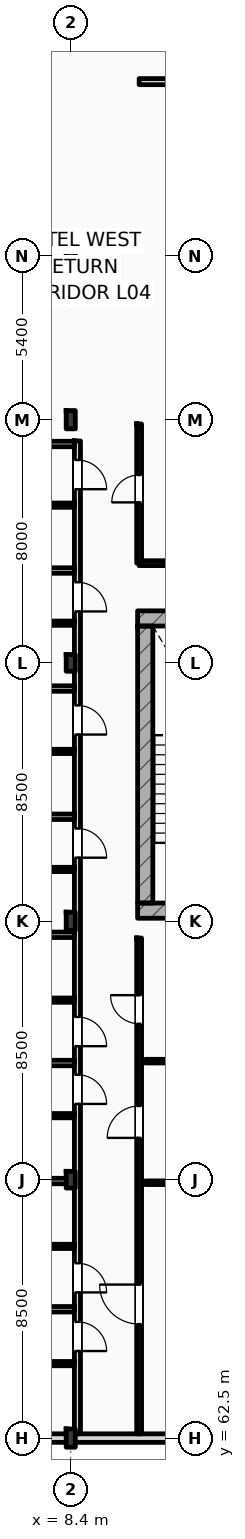
"""IFC4 building model, lengths in metres.
Left out: names, types, materials, properties, quantities, classifications, styles, units other than length and angle.
Written with IfcOpenShell. Run it as: python <this file> out.ifc"""

import sys

from ifc_helpers import new_model, si_unit, direction, frame, frame_2d, origin, origin_2d, place, context, subcontext, project, spatial, rectangle, i_section, extrude, element, fill, save


model = new_model("IFC4")
c1 = context("Model", 3, precision=1e-05, world=origin(), true_north=direction((0.0, 1.0)))
c2 = subcontext(c1, "Body", "Model", "MODEL_VIEW")
j1 = project(units=[si_unit("LENGTHUNIT", "METRE"), si_unit("PLANEANGLEUNIT", "RADIAN")], contexts=[c1])
p1 = place(None, origin())
s1 = spatial("IfcSite", under=j1, at=p1, CompositionType="ELEMENT")
p2 = place(p1, origin())
s2 = spatial("IfcBuilding", under=s1, at=p2, CompositionType="ELEMENT")
p3 = place(p2, frame((0.0, 0.0, 20.4)))
s3 = spatial("IfcBuildingStorey", under=s2, at=p3, CompositionType="ELEMENT", Elevation=20.4)
p4 = place(p3, frame((8.4, 62.5, 0.0), z_axis=(0.0, 0.0, 1.0), x_axis=(1.0, 0.0, 0.0)))
e1 = element("IfcColumn", 1, at=p4, inside=s3, PredefinedType="COLUMN", context=c2, shape_type="SweptSolid", body=[
    extrude(i_section(OverallWidth=0.3, OverallDepth=0.6, WebThickness=0.015, FlangeThickness=0.03, FilletRadius=0.027, at=origin_2d()), origin(), (0.0, 0.0, 1.0), 4.2),
])
p5 = place(p3, frame((8.4, 71.0, 0.0), z_axis=(0.0, 0.0, 1.0), x_axis=(1.0, 0.0, 0.0)))
e2 = element("IfcColumn", 2, at=p5, inside=s3, PredefinedType="COLUMN", context=c2, shape_type="SweptSolid", body=[
    extrude(i_section(OverallWidth=0.3, OverallDepth=0.55, WebThickness=0.015, FlangeThickness=0.029, FilletRadius=0.027, at=origin_2d()), origin(), (0.0, 0.0, 1.0), 4.2),
])
p6 = place(p3, frame((8.4, 79.5, 0.0), z_axis=(0.0, 0.0, 1.0), x_axis=(1.0, 0.0, 0.0)))
e3 = element("IfcColumn", 3, at=p6, inside=s3, PredefinedType="COLUMN", context=c2, shape_type="SweptSolid", body=[
    extrude(i_section(OverallWidth=0.3, OverallDepth=0.6, WebThickness=0.015, FlangeThickness=0.03, FilletRadius=0.027, at=origin_2d()), origin(), (0.0, 0.0, 1.0), 4.2),
])
p7 = place(p3, frame((8.4, 88.0, 0.0), z_axis=(0.0, 0.0, 1.0), x_axis=(1.0, 0.0, 0.0)))
e4 = element("IfcColumn", 4, at=p7, inside=s3, PredefinedType="COLUMN", context=c2, shape_type="SweptSolid", body=[
    extrude(i_section(OverallWidth=0.3, OverallDepth=0.55, WebThickness=0.015, FlangeThickness=0.029, FilletRadius=0.027, at=origin_2d()), origin(), (0.0, 0.0, 1.0), 4.2),
])
p8 = place(p3, frame((8.4, 96.0, 0.0), z_axis=(0.0, 0.0, 1.0), x_axis=(1.0, 0.0, 0.0)))
e5 = element("IfcColumn", 5, at=p8, inside=s3, PredefinedType="COLUMN", context=c2, shape_type="SweptSolid", body=[
    extrude(i_section(OverallWidth=0.3, OverallDepth=0.6, WebThickness=0.015, FlangeThickness=0.03, FilletRadius=0.027, at=origin_2d()), origin(), (0.0, 0.0, 1.0), 4.2),
])
p9 = place(p3, frame((8.4, 101.4, 0.0), z_axis=(0.0, 0.0, 1.0), x_axis=(1.0, 0.0, 0.0)))
e6 = element("IfcColumn", 6, at=p9, inside=s3, PredefinedType="COLUMN", context=c2, shape_type="SweptSolid", body=[
    extrude(i_section(OverallWidth=0.3, OverallDepth=0.55, WebThickness=0.015, FlangeThickness=0.029, FilletRadius=0.027, at=origin_2d()), origin(), (0.0, 0.0, 1.0), 4.2),
])
for number, where, z_axis, x_axis in (
    (7, (10.6, 89.462, 0.0), (0.0, 0.0, 1.0), (1.0, 0.0, 0.0)),
    (8, (10.6, 79.85, 0.0), (0.0, 0.0, 1.0), (1.0, 0.0, 0.0)),
):
    element("IfcWall", number, at=place(p3, frame(where, z_axis=z_axis, x_axis=x_axis)), inside=s3, PredefinedType="SHEAR", context=c2, shape_type="SweptSolid", body=[
        extrude(rectangle(XDim=5.16, YDim=0.5, at=frame_2d((2.58, 0.0))), origin(), (0.0, 0.0, 1.0), 4.2),
    ])
p10 = place(p3, frame((10.85, 80.1, 0.0), z_axis=(0.0, 0.0, 1.0), x_axis=(0.0, 1.0, 0.0)))
e9 = element("IfcWall", 9, at=p10, inside=s3, PredefinedType="SHEAR", context=c2, shape_type="SweptSolid", body=[
    extrude(rectangle(XDim=9.112, YDim=0.5, at=frame_2d((4.556, 0.0))), origin(), (0.0, 0.0, 1.0), 4.2),
])
p11 = place(p3, frame((0.0, 62.5, 0.0), z_axis=(0.0, 0.0, 1.0), x_axis=(1.0, 0.0, 0.0)))
e10 = element("IfcWall", 10, at=p11, inside=s3, PredefinedType="STANDARD", context=c2, shape_type="SweptSolid", body=[
    extrude(rectangle(XDim=25.2, YDim=0.28, at=frame_2d((12.6, 0.0))), origin(), (0.0, 0.0, 1.0), 3.38),
])
p12 = place(p3, frame((10.65, 107.12, 0.0), z_axis=(0.0, 0.0, 1.0), x_axis=(1.0, 0.0, 0.0)))
e11 = element("IfcWall", 11, at=p12, inside=s3, PredefinedType="PARTITIONING", context=c2, shape_type="SweptSolid", body=[
    extrude(rectangle(XDim=14.8, YDim=0.2, at=frame_2d((7.4, 0.0))), origin(), (0.0, 0.0, 1.0), 3.94),
])
p13 = place(p12, frame((8.5, 0.0, 0.0)))
e12 = element("IfcOpeningElement", 12, at=p13, cuts=e11, PredefinedType="OPENING", context=c2, shape_type="SweptSolid", body=[
    extrude(rectangle(XDim=1.25, YDim=2.15, at=frame_2d((0.625, 1.075))), frame((0.0, 0.11, 0.0), z_axis=(0.0, -1.0, 0.0), x_axis=(1.0, 0.0, 0.0)), (0.0, 0.0, 1.0), 0.22),
])
p14 = place(p3, frame((8.62, 62.64, 0.0), z_axis=(0.0, 0.0, 1.0), x_axis=(0.0, 1.0, 0.0)))
e13 = element("IfcWall", 13, at=p14, inside=s3, PredefinedType="PARTITIONING", context=c2, shape_type="SweptSolid", body=[
    extrude(rectangle(XDim=32.66, YDim=0.2, at=frame_2d((16.33, 0.0))), origin(), (0.0, 0.0, 1.0), 3.53),
])
p15 = place(p14, frame((2.724, 0.0, 0.0)))
e14 = element("IfcOpeningElement", 14, at=p15, cuts=e13, PredefinedType="OPENING", context=c2, shape_type="SweptSolid", body=[
    extrude(rectangle(XDim=0.96, YDim=2.2, at=frame_2d((0.48, 1.1))), frame((0.0, 0.11, 0.0), z_axis=(0.0, -1.0, 0.0), x_axis=(1.0, 0.0, 0.0)), (0.0, 0.0, 1.0), 0.22),
])
p16 = place(p14, frame((4.652, 0.0, 0.0)))
e15 = element("IfcOpeningElement", 15, at=p16, cuts=e13, PredefinedType="OPENING", context=c2, shape_type="SweptSolid", body=[
    extrude(rectangle(XDim=0.96, YDim=2.2, at=frame_2d((0.48, 1.1))), frame((0.0, 0.11, 0.0), z_axis=(0.0, -1.0, 0.0), x_axis=(1.0, 0.0, 0.0)), (0.0, 0.0, 1.0), 0.22),
])
p17 = place(p14, frame((10.852, 0.0, 0.0)))
e16 = element("IfcOpeningElement", 16, at=p17, cuts=e13, PredefinedType="OPENING", context=c2, shape_type="SweptSolid", body=[
    extrude(rectangle(XDim=0.96, YDim=2.2, at=frame_2d((0.48, 1.1))), frame((0.0, 0.11, 0.0), z_axis=(0.0, -1.0, 0.0), x_axis=(1.0, 0.0, 0.0)), (0.0, 0.0, 1.0), 0.22),
])
p18 = place(p14, frame((12.752, 0.0, 0.0)))
e17 = element("IfcOpeningElement", 17, at=p18, cuts=e13, PredefinedType="OPENING", context=c2, shape_type="SweptSolid", body=[
    extrude(rectangle(XDim=0.96, YDim=2.2, at=frame_2d((0.48, 1.1))), frame((0.0, 0.11, 0.0), z_axis=(0.0, -1.0, 0.0), x_axis=(1.0, 0.0, 0.0)), (0.0, 0.0, 1.0), 0.22),
])
p19 = place(p14, frame((18.952, 0.0, 0.0)))
e18 = element("IfcOpeningElement", 18, at=p19, cuts=e13, PredefinedType="OPENING", context=c2, shape_type="SweptSolid", body=[
    extrude(rectangle(XDim=0.96, YDim=2.2, at=frame_2d((0.48, 1.1))), frame((0.0, 0.11, 0.0), z_axis=(0.0, -1.0, 0.0), x_axis=(1.0, 0.0, 0.0)), (0.0, 0.0, 1.0), 0.22),
])
p20 = place(p14, frame((23.002, 0.0, 0.0)))
e19 = element("IfcOpeningElement", 19, at=p20, cuts=e13, PredefinedType="OPENING", context=c2, shape_type="SweptSolid", body=[
    extrude(rectangle(XDim=0.96, YDim=2.2, at=frame_2d((0.48, 1.1))), frame((0.0, 0.11, 0.0), z_axis=(0.0, -1.0, 0.0), x_axis=(1.0, 0.0, 0.0)), (0.0, 0.0, 1.0), 0.22),
])
p21 = place(p14, frame((27.052, 0.0, 0.0)))
e20 = element("IfcOpeningElement", 20, at=p21, cuts=e13, PredefinedType="OPENING", context=c2, shape_type="SweptSolid", body=[
    extrude(rectangle(XDim=0.96, YDim=2.2, at=frame_2d((0.48, 1.1))), frame((0.0, 0.11, 0.0), z_axis=(0.0, -1.0, 0.0), x_axis=(1.0, 0.0, 0.0)), (0.0, 0.0, 1.0), 0.22),
])
p22 = place(p14, frame((31.074, 0.0, 0.0)))
e21 = element("IfcOpeningElement", 21, at=p22, cuts=e13, PredefinedType="OPENING", context=c2, shape_type="SweptSolid", body=[
    extrude(rectangle(XDim=0.96, YDim=2.2, at=frame_2d((0.48, 1.1))), frame((0.0, 0.11, 0.0), z_axis=(0.0, -1.0, 0.0), x_axis=(1.0, 0.0, 0.0)), (0.0, 0.0, 1.0), 0.22),
])
p23 = place(p3, frame((10.65, 62.64, 0.0), z_axis=(0.0, 0.0, 1.0), x_axis=(0.0, 1.0, 0.0)))
e22 = element("IfcWall", 22, at=p23, inside=s3, PredefinedType="PARTITIONING", context=c2, shape_type="SweptSolid", body=[
    extrude(rectangle(XDim=16.31, YDim=0.16, at=frame_2d((8.155, 0.0))), origin(), (0.0, 0.0, 1.0), 3.94),
])
p24 = place(p23, frame((3.61, 0.0, 0.0)))
e23 = element("IfcOpeningElement", 23, at=p24, cuts=e22, PredefinedType="OPENING", context=c2, shape_type="SweptSolid", body=[
    extrude(rectangle(XDim=1.3, YDim=2.2, at=frame_2d((0.65, 1.1))), frame((0.0, 0.09, 0.0), z_axis=(0.0, -1.0, 0.0), x_axis=(1.0, 0.0, 0.0)), (0.0, 0.0, 1.0), 0.18),
])
p25 = place(p23, frame((9.735, 0.0, 0.0)))
e24 = element("IfcOpeningElement", 24, at=p25, cuts=e22, PredefinedType="OPENING", context=c2, shape_type="SweptSolid", body=[
    extrude(rectangle(XDim=1.05, YDim=2.12, at=frame_2d((0.525, 1.06))), frame((0.0, 0.09, 0.0), z_axis=(0.0, -1.0, 0.0), x_axis=(1.0, 0.0, 0.0)), (0.0, 0.0, 1.0), 0.18),
])
p26 = place(p23, frame((13.49, 0.0, 0.0)))
e25 = element("IfcOpeningElement", 25, at=p26, cuts=e22, PredefinedType="OPENING", context=c2, shape_type="SweptSolid", body=[
    extrude(rectangle(XDim=0.94, YDim=2.15, at=frame_2d((0.47, 1.075))), frame((0.0, 0.09, 0.0), z_axis=(0.0, -1.0, 0.0), x_axis=(1.0, 0.0, 0.0)), (0.0, 0.0, 1.0), 0.18),
])
p27 = place(p3, frame((10.65, 91.28, 0.0), z_axis=(0.0, 0.0, 1.0), x_axis=(0.0, 1.0, 0.0)))
e26 = element("IfcWall", 26, at=p27, inside=s3, PredefinedType="PARTITIONING", context=c2, shape_type="SweptSolid", body=[
    extrude(rectangle(XDim=4.58, YDim=0.16, at=frame_2d((2.29, 0.0))), origin(), (0.0, 0.0, 1.0), 3.94),
])
p28 = place(p27, frame((2.0, 0.0, 0.0)))
e27 = element("IfcOpeningElement", 27, at=p28, cuts=e26, PredefinedType="OPENING", context=c2, shape_type="SweptSolid", body=[
    extrude(rectangle(XDim=0.9, YDim=2.1, at=frame_2d((0.45, 1.05))), frame((0.0, 0.09, 0.0), z_axis=(0.0, -1.0, 0.0), x_axis=(1.0, 0.0, 0.0)), (0.0, 0.0, 1.0), 0.18),
])
p29 = place(p3, frame((10.65, 91.28, 0.0), z_axis=(0.0, 0.0, 1.0), x_axis=(1.0, 0.0, 0.0)))
e28 = element("IfcWall", 28, at=p29, inside=s3, PredefinedType="PARTITIONING", context=c2, shape_type="SweptSolid", body=[
    extrude(rectangle(XDim=6.9, YDim=0.16, at=frame_2d((3.45, 0.0))), origin(), (0.0, 0.0, 1.0), 3.94),
])
p30 = place(p3, frame((0.15, 66.738, 0.0), z_axis=(0.0, 0.0, 1.0), x_axis=(1.0, 0.0, 0.0)))
e29 = element("IfcWall", 29, at=p30, inside=s3, PredefinedType="PARTITIONING", context=c2, shape_type="SweptSolid", body=[
    extrude(rectangle(XDim=8.37, YDim=0.18, at=frame_2d((4.185, 0.0))), origin(), (0.0, 0.0, 1.0), 3.94),
])
p31 = place(p3, frame((5.05, 64.95, 0.0), z_axis=(0.0, 0.0, 1.0), x_axis=(1.0, 0.0, 0.0)))
e30 = element("IfcWall", 30, at=p31, inside=s3, PredefinedType="PARTITIONING", context=c2, shape_type="SweptSolid", body=[
    extrude(rectangle(XDim=3.47, YDim=0.14, at=frame_2d((1.735, 0.0))), origin(), (0.0, 0.0, 1.0), 3.94),
])
p32 = place(p3, frame((0.15, 70.956, 0.0), z_axis=(0.0, 0.0, 1.0), x_axis=(1.0, 0.0, 0.0)))
e31 = element("IfcWall", 31, at=p32, inside=s3, PredefinedType="PARTITIONING", context=c2, shape_type="SweptSolid", body=[
    extrude(rectangle(XDim=8.37, YDim=0.18, at=frame_2d((4.185, 0.0))), origin(), (0.0, 0.0, 1.0), 3.38),
])
p33 = place(p3, frame((5.05, 68.806, 0.0), z_axis=(0.0, 0.0, 1.0), x_axis=(1.0, 0.0, 0.0)))
e32 = element("IfcWall", 32, at=p33, inside=s3, PredefinedType="PARTITIONING", context=c2, shape_type="SweptSolid", body=[
    extrude(rectangle(XDim=3.47, YDim=0.14, at=frame_2d((1.735, 0.0))), origin(), (0.0, 0.0, 1.0), 3.94),
])
p34 = place(p3, frame((0.15, 74.838, 0.0), z_axis=(0.0, 0.0, 1.0), x_axis=(1.0, 0.0, 0.0)))
e33 = element("IfcWall", 33, at=p34, inside=s3, PredefinedType="PARTITIONING", context=c2, shape_type="SweptSolid", body=[
    extrude(rectangle(XDim=8.37, YDim=0.18, at=frame_2d((4.185, 0.0))), origin(), (0.0, 0.0, 1.0), 3.94),
])
p35 = place(p3, frame((5.05, 73.106, 0.0), z_axis=(0.0, 0.0, 1.0), x_axis=(1.0, 0.0, 0.0)))
e34 = element("IfcWall", 34, at=p35, inside=s3, PredefinedType="PARTITIONING", context=c2, shape_type="SweptSolid", body=[
    extrude(rectangle(XDim=3.47, YDim=0.14, at=frame_2d((1.735, 0.0))), origin(), (0.0, 0.0, 1.0), 3.94),
])
p36 = place(p3, frame((0.15, 79.056, 0.0), z_axis=(0.0, 0.0, 1.0), x_axis=(1.0, 0.0, 0.0)))
e35 = element("IfcWall", 35, at=p36, inside=s3, PredefinedType="PARTITIONING", context=c2, shape_type="SweptSolid", body=[
    extrude(rectangle(XDim=8.37, YDim=0.18, at=frame_2d((4.185, 0.0))), origin(), (0.0, 0.0, 1.0), 3.94),
])
p37 = place(p3, frame((5.05, 76.906, 0.0), z_axis=(0.0, 0.0, 1.0), x_axis=(1.0, 0.0, 0.0)))
e36 = element("IfcWall", 36, at=p37, inside=s3, PredefinedType="PARTITIONING", context=c2, shape_type="SweptSolid", body=[
    extrude(rectangle(XDim=3.47, YDim=0.14, at=frame_2d((1.735, 0.0))), origin(), (0.0, 0.0, 1.0), 3.94),
])
p38 = place(p3, frame((0.15, 82.938, 0.0), z_axis=(0.0, 0.0, 1.0), x_axis=(1.0, 0.0, 0.0)))
e37 = element("IfcWall", 37, at=p38, inside=s3, PredefinedType="PARTITIONING", context=c2, shape_type="SweptSolid", body=[
    extrude(rectangle(XDim=8.37, YDim=0.18, at=frame_2d((4.185, 0.0))), origin(), (0.0, 0.0, 1.0), 3.94),
])
p39 = place(p3, frame((5.05, 81.206, 0.0), z_axis=(0.0, 0.0, 1.0), x_axis=(1.0, 0.0, 0.0)))
e38 = element("IfcWall", 38, at=p39, inside=s3, PredefinedType="PARTITIONING", context=c2, shape_type="SweptSolid", body=[
    extrude(rectangle(XDim=3.47, YDim=0.14, at=frame_2d((1.735, 0.0))), origin(), (0.0, 0.0, 1.0), 3.94),
])
p40 = place(p3, frame((0.15, 87.156, 0.0), z_axis=(0.0, 0.0, 1.0), x_axis=(1.0, 0.0, 0.0)))
e39 = element("IfcWall", 39, at=p40, inside=s3, PredefinedType="PARTITIONING", context=c2, shape_type="SweptSolid", body=[
    extrude(rectangle(XDim=8.37, YDim=0.18, at=frame_2d((4.185, 0.0))), origin(), (0.0, 0.0, 1.0), 3.94),
])
p41 = place(p3, frame((5.05, 85.088, 0.0), z_axis=(0.0, 0.0, 1.0), x_axis=(1.0, 0.0, 0.0)))
e40 = element("IfcWall", 40, at=p41, inside=s3, PredefinedType="PARTITIONING", context=c2, shape_type="SweptSolid", body=[
    extrude(rectangle(XDim=3.47, YDim=0.14, at=frame_2d((1.735, 0.0))), origin(), (0.0, 0.0, 1.0), 3.94),
])
p42 = place(p3, frame((0.15, 91.038, 0.0), z_axis=(0.0, 0.0, 1.0), x_axis=(1.0, 0.0, 0.0)))
e41 = element("IfcWall", 41, at=p42, inside=s3, PredefinedType="PARTITIONING", context=c2, shape_type="SweptSolid", body=[
    extrude(rectangle(XDim=8.37, YDim=0.18, at=frame_2d((4.185, 0.0))), origin(), (0.0, 0.0, 1.0), 3.94),
])
p43 = place(p3, frame((5.05, 89.306, 0.0), z_axis=(0.0, 0.0, 1.0), x_axis=(1.0, 0.0, 0.0)))
e42 = element("IfcWall", 42, at=p43, inside=s3, PredefinedType="PARTITIONING", context=c2, shape_type="SweptSolid", body=[
    extrude(rectangle(XDim=3.47, YDim=0.14, at=frame_2d((1.735, 0.0))), origin(), (0.0, 0.0, 1.0), 3.94),
])
p44 = place(p3, frame((0.15, 95.2, 0.0), z_axis=(0.0, 0.0, 1.0), x_axis=(1.0, 0.0, 0.0)))
e43 = element("IfcWall", 43, at=p44, inside=s3, PredefinedType="PARTITIONING", context=c2, shape_type="SweptSolid", body=[
    extrude(rectangle(XDim=8.37, YDim=0.18, at=frame_2d((4.185, 0.0))), origin(), (0.0, 0.0, 1.0), 3.94),
])
p45 = place(p3, frame((5.05, 93.188, 0.0), z_axis=(0.0, 0.0, 1.0), x_axis=(1.0, 0.0, 0.0)))
e44 = element("IfcWall", 44, at=p45, inside=s3, PredefinedType="PARTITIONING", context=c2, shape_type="SweptSolid", body=[
    extrude(rectangle(XDim=3.47, YDim=0.14, at=frame_2d((1.735, 0.0))), origin(), (0.0, 0.0, 1.0), 3.94),
])
p46 = place(p3, frame((10.85, 70.9, 0.0), z_axis=(0.0, 0.0, 1.0), x_axis=(1.0, 0.0, 0.0)))
e45 = element("IfcWall", 45, at=p46, inside=s3, PredefinedType="PARTITIONING", context=c2, shape_type="SweptSolid", body=[
    extrude(rectangle(XDim=7.35, YDim=0.12, at=frame_2d((3.675, 0.0))), origin(), (0.0, 0.0, 1.0), 3.38),
])
p47 = place(p3, frame((10.85, 74.9, 0.0), z_axis=(0.0, 0.0, 1.0), x_axis=(1.0, 0.0, 0.0)))
e46 = element("IfcWall", 46, at=p47, inside=s3, PredefinedType="PARTITIONING", context=c2, shape_type="SweptSolid", body=[
    extrude(rectangle(XDim=5.35, YDim=0.12, at=frame_2d((2.675, 0.0))), origin(), (0.0, 0.0, 1.0), 3.94),
])
p48 = place(p15, frame((0.96, 0.0, 0.0), z_axis=(0.0, 0.0, 1.0), x_axis=(-1.0, 0.0, 0.0)))
e47 = element("IfcDoor", 47, at=p48, inside=s3, OperationType="SINGLE_SWING_LEFT", PredefinedType="DOOR", context=c2, shape_type="SweptSolid", body=[
    extrude(rectangle(XDim=0.96, YDim=2.2, at=frame_2d((0.48, 1.1))), frame((0.0, 0.025, 0.0), z_axis=(0.0, -1.0, 0.0), x_axis=(1.0, 0.0, 0.0)), (0.0, 0.0, 1.0), 0.05),
])
fill(e14, e47)
p49 = place(p16, frame((0.96, 0.0, 0.0), z_axis=(0.0, 0.0, 1.0), x_axis=(-1.0, 0.0, 0.0)))
e48 = element("IfcDoor", 48, at=p49, inside=s3, OperationType="SINGLE_SWING_LEFT", PredefinedType="DOOR", context=c2, shape_type="SweptSolid", body=[
    extrude(rectangle(XDim=0.96, YDim=2.2, at=frame_2d((0.48, 1.1))), frame((0.0, 0.025, 0.0), z_axis=(0.0, -1.0, 0.0), x_axis=(1.0, 0.0, 0.0)), (0.0, 0.0, 1.0), 0.05),
])
fill(e15, e48)
p50 = place(p17, frame((0.96, 0.0, 0.0), z_axis=(0.0, 0.0, 1.0), x_axis=(-1.0, 0.0, 0.0)))
e49 = element("IfcDoor", 49, at=p50, inside=s3, OperationType="SINGLE_SWING_LEFT", PredefinedType="DOOR", context=c2, shape_type="SweptSolid", body=[
    extrude(rectangle(XDim=0.96, YDim=2.2, at=frame_2d((0.48, 1.1))), frame((0.0, 0.025, 0.0), z_axis=(0.0, -1.0, 0.0), x_axis=(1.0, 0.0, 0.0)), (0.0, 0.0, 1.0), 0.05),
])
fill(e16, e49)
p51 = place(p18, frame((0.96, 0.0, 0.0), z_axis=(0.0, 0.0, 1.0), x_axis=(-1.0, 0.0, 0.0)))
e50 = element("IfcDoor", 50, at=p51, inside=s3, OperationType="SINGLE_SWING_LEFT", PredefinedType="DOOR", context=c2, shape_type="SweptSolid", body=[
    extrude(rectangle(XDim=0.96, YDim=2.2, at=frame_2d((0.48, 1.1))), frame((0.0, 0.025, 0.0), z_axis=(0.0, -1.0, 0.0), x_axis=(1.0, 0.0, 0.0)), (0.0, 0.0, 1.0), 0.05),
])
fill(e17, e50)
p52 = place(p19, frame((0.96, 0.0, 0.0), z_axis=(0.0, 0.0, 1.0), x_axis=(-1.0, 0.0, 0.0)))
e51 = element("IfcDoor", 51, at=p52, inside=s3, OperationType="SINGLE_SWING_LEFT", PredefinedType="DOOR", context=c2, shape_type="SweptSolid", body=[
    extrude(rectangle(XDim=0.96, YDim=2.2, at=frame_2d((0.48, 1.1))), frame((0.0, 0.025, 0.0), z_axis=(0.0, -1.0, 0.0), x_axis=(1.0, 0.0, 0.0)), (0.0, 0.0, 1.0), 0.05),
])
fill(e18, e51)
p53 = place(p20, frame((0.96, 0.0, 0.0), z_axis=(0.0, 0.0, 1.0), x_axis=(-1.0, 0.0, 0.0)))
e52 = element("IfcDoor", 52, at=p53, inside=s3, OperationType="SINGLE_SWING_LEFT", PredefinedType="DOOR", context=c2, shape_type="SweptSolid", body=[
    extrude(rectangle(XDim=0.96, YDim=2.2, at=frame_2d((0.48, 1.1))), frame((0.0, 0.025, 0.0), z_axis=(0.0, -1.0, 0.0), x_axis=(1.0, 0.0, 0.0)), (0.0, 0.0, 1.0), 0.05),
])
fill(e19, e52)
p54 = place(p21, frame((0.96, 0.0, 0.0), z_axis=(0.0, 0.0, 1.0), x_axis=(-1.0, 0.0, 0.0)))
e53 = element("IfcDoor", 53, at=p54, inside=s3, OperationType="SINGLE_SWING_LEFT", PredefinedType="DOOR", context=c2, shape_type="SweptSolid", body=[
    extrude(rectangle(XDim=0.96, YDim=2.2, at=frame_2d((0.48, 1.1))), frame((0.0, 0.025, 0.0), z_axis=(0.0, -1.0, 0.0), x_axis=(1.0, 0.0, 0.0)), (0.0, 0.0, 1.0), 0.05),
])
fill(e20, e53)
p55 = place(p22, frame((0.96, 0.0, 0.0), z_axis=(0.0, 0.0, 1.0), x_axis=(-1.0, 0.0, 0.0)))
e54 = element("IfcDoor", 54, at=p55, inside=s3, OperationType="SINGLE_SWING_LEFT", PredefinedType="DOOR", context=c2, shape_type="SweptSolid", body=[
    extrude(rectangle(XDim=0.96, YDim=2.2, at=frame_2d((0.48, 1.1))), frame((0.0, 0.025, 0.0), z_axis=(0.0, -1.0, 0.0), x_axis=(1.0, 0.0, 0.0)), (0.0, 0.0, 1.0), 0.05),
])
fill(e21, e54)
p56 = place(p24, origin())
e55 = element("IfcDoor", 55, at=p56, inside=s3, OperationType="SINGLE_SWING_RIGHT", PredefinedType="DOOR", context=c2, shape_type="SweptSolid", body=[
    extrude(rectangle(XDim=1.3, YDim=2.2, at=frame_2d((0.65, 1.1))), frame((0.0, 0.025, 0.0), z_axis=(0.0, -1.0, 0.0), x_axis=(1.0, 0.0, 0.0)), (0.0, 0.0, 1.0), 0.05),
])
fill(e23, e55)
p57 = place(p25, origin())
e56 = element("IfcDoor", 56, at=p57, inside=s3, OperationType="SINGLE_SWING_LEFT", PredefinedType="DOOR", context=c2, shape_type="SweptSolid", body=[
    extrude(rectangle(XDim=1.05, YDim=2.12, at=frame_2d((0.525, 1.06))), frame((0.0, 0.025, 0.0), z_axis=(0.0, -1.0, 0.0), x_axis=(1.0, 0.0, 0.0)), (0.0, 0.0, 1.0), 0.05),
])
fill(e24, e56)
p58 = place(p26, origin())
e57 = element("IfcDoor", 57, at=p58, inside=s3, OperationType="SINGLE_SWING_RIGHT", PredefinedType="DOOR", context=c2, shape_type="SweptSolid", body=[
    extrude(rectangle(XDim=0.94, YDim=2.15, at=frame_2d((0.47, 1.075))), frame((0.0, 0.025, 0.0), z_axis=(0.0, -1.0, 0.0), x_axis=(1.0, 0.0, 0.0)), (0.0, 0.0, 1.0), 0.05),
])
fill(e25, e57)
p59 = place(p28, origin())
e58 = element("IfcDoor", 58, at=p59, inside=s3, OperationType="SINGLE_SWING_LEFT", PredefinedType="DOOR", context=c2, shape_type="SweptSolid", body=[
    extrude(rectangle(XDim=0.9, YDim=2.1, at=frame_2d((0.45, 1.05))), frame((0.0, 0.025, 0.0), z_axis=(0.0, -1.0, 0.0), x_axis=(1.0, 0.0, 0.0)), (0.0, 0.0, 1.0), 0.05),
])
fill(e27, e58)
save(model, sys.argv[1])
